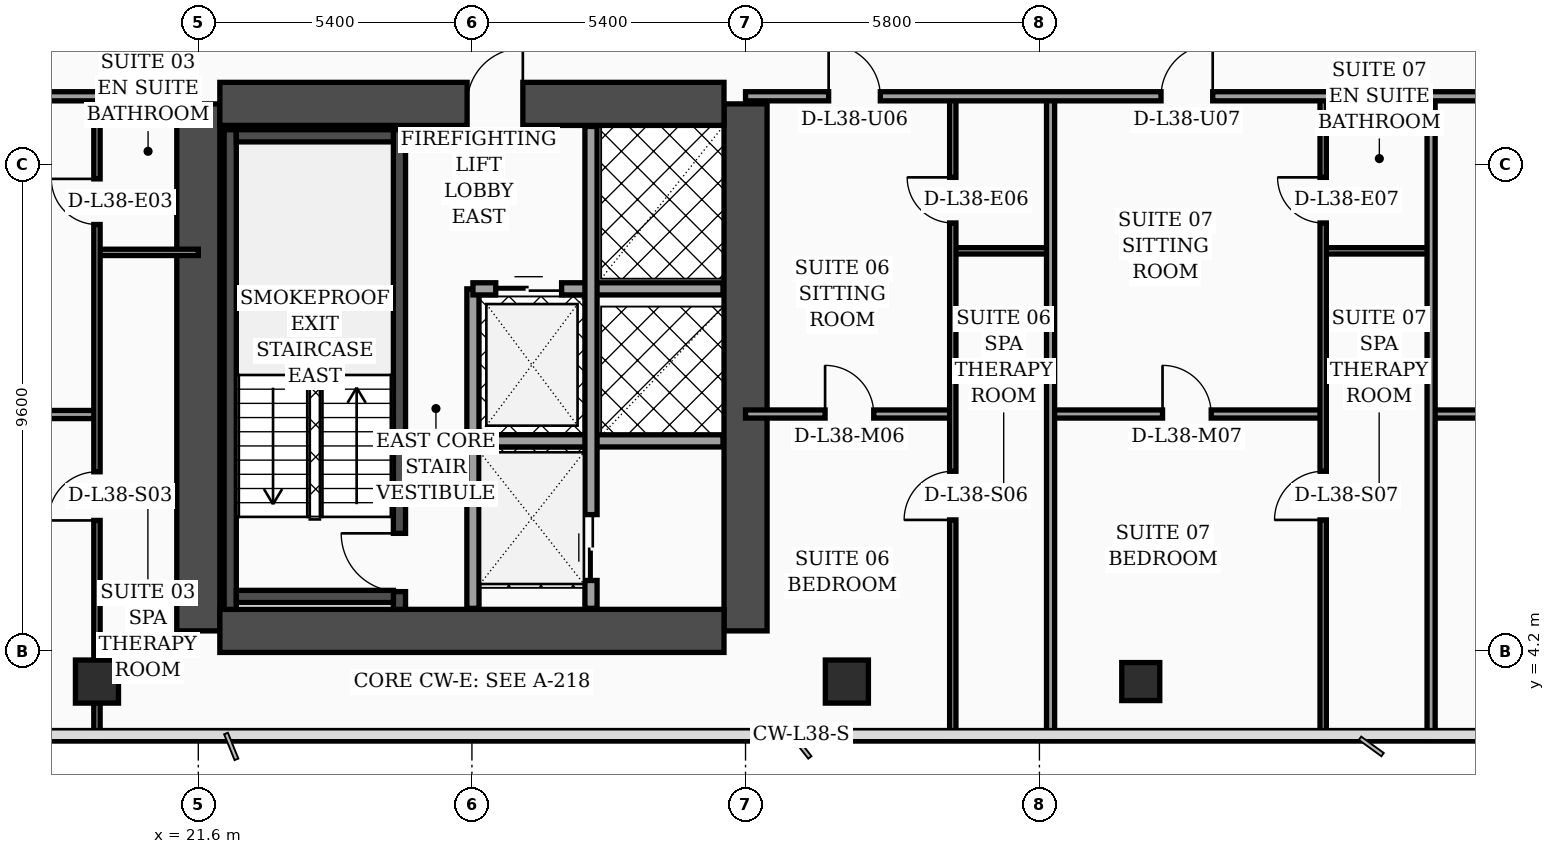
"""IFC4 building model, lengths in metres.
Left out: names, types, materials, properties, quantities, classifications, styles, units other than length and angle.
Written with IfcOpenShell. Run it as: python <this file> out.ifc"""

import sys

from ifc_helpers import new_model, si_unit, direction, frame, frame_2d, origin, origin_2d, place, context, subcontext, project, spatial, rectangle, hollow_rectangle, extrude, element, fill, save


model = new_model("IFC4")
c1 = context("Model", 3, precision=1e-05, world=origin(), true_north=direction((0.0, 1.0)))
c2 = subcontext(c1, "Body", "Model", "MODEL_VIEW")
j1 = project(units=[si_unit("LENGTHUNIT", "METRE"), si_unit("PLANEANGLEUNIT", "RADIAN")], contexts=[c1])
p1 = place(None, origin())
s1 = spatial("IfcSite", under=j1, at=p1, CompositionType="ELEMENT")
p2 = place(p1, origin())
s2 = spatial("IfcBuilding", under=s1, at=p2, CompositionType="ELEMENT")
p3 = place(p2, frame((0.0, 0.0, 156.1)))
s3 = spatial("IfcBuildingStorey", under=s2, at=p3, CompositionType="ELEMENT", Elevation=156.1)
for number, where, z_axis, x_axis in (
    (1, (21.6, 4.6, 0.0), (0.0, 0.0, 1.0), (0.0, 1.0, 0.0)),
    (2, (32.4, 4.6, 0.0), (0.0, 0.0, 1.0), (0.0, 1.0, 0.0)),
):
    element("IfcWall", number, at=place(p3, frame(where, z_axis=z_axis, x_axis=x_axis)), inside=s3, PredefinedType="SHEAR", context=c2, shape_type="SweptSolid", body=[
        extrude(rectangle(XDim=10.4, YDim=0.85, at=frame_2d((5.2, 0.0))), origin(), (0.0, 0.0, 1.0), 3.56),
    ])
p4 = place(p3, frame((22.025, 15.0, 0.0), z_axis=(0.0, 0.0, 1.0), x_axis=(1.0, 0.0, 0.0)))
e3 = element("IfcWall", 3, at=p4, inside=s3, PredefinedType="SHEAR", context=c2, shape_type="SweptSolid", body=[
    extrude(rectangle(XDim=9.95, YDim=0.85, at=frame_2d((4.975, 0.0))), origin(), (0.0, 0.0, 1.0), 3.56),
])
p5 = place(p4, frame((4.88, 0.0, 0.0)))
e4 = element("IfcOpeningElement", 4, at=p5, cuts=e3, PredefinedType="OPENING", context=c2, shape_type="SweptSolid", body=[
    extrude(rectangle(XDim=1.1, YDim=2.2, at=frame_2d((0.55, 1.1))), frame((0.0, 0.435, 0.0), z_axis=(0.0, -1.0, 0.0), x_axis=(1.0, 0.0, 0.0)), (0.0, 0.0, 1.0), 0.87),
])
p6 = place(p3, frame((22.025, 4.6, 0.0), z_axis=(0.0, 0.0, 1.0), x_axis=(1.0, 0.0, 0.0)))
e5 = element("IfcWall", 5, at=p6, inside=s3, PredefinedType="SHEAR", context=c2, shape_type="SweptSolid", body=[
    extrude(rectangle(XDim=9.95, YDim=0.85, at=frame_2d((4.975, 0.0))), origin(), (0.0, 0.0, 1.0), 3.56),
])
p7 = place(p3, frame((22.23, 5.025, 0.0), z_axis=(0.0, 0.0, 1.0), x_axis=(0.0, 1.0, 0.0)))
e6 = element("IfcWall", 6, at=p7, inside=s3, PredefinedType="SOLIDWALL", context=c2, shape_type="SweptSolid", body=[
    extrude(rectangle(XDim=9.465, YDim=0.24, at=frame_2d((4.732, 0.0))), origin(), (0.0, 0.0, 1.0), 3.56),
])
p8 = place(p3, frame((25.57, 5.025, 0.0), z_axis=(0.0, 0.0, 1.0), x_axis=(0.0, 1.0, 0.0)))
e7 = element("IfcWall", 7, at=p8, inside=s3, PredefinedType="SOLIDWALL", context=c2, shape_type="SweptSolid", body=[
    extrude(rectangle(XDim=9.465, YDim=0.24, at=frame_2d((4.732, 0.0))), origin(), (0.0, 0.0, 1.0), 3.56),
])
p9 = place(p8, frame((0.35, 0.0, 0.0)))
e8 = element("IfcOpeningElement", 8, at=p9, cuts=e7, PredefinedType="OPENING", context=c2, shape_type="SweptSolid", body=[
    extrude(rectangle(XDim=1.15, YDim=2.2, at=frame_2d((0.575, 1.1))), frame((0.0, 0.13, 0.0), z_axis=(0.0, -1.0, 0.0), x_axis=(1.0, 0.0, 0.0)), (0.0, 0.0, 1.0), 0.26),
])
for number, where, z_axis, x_axis in (
    (9, (22.35, 5.28, 0.0), (0.0, 0.0, 1.0), (1.0, 0.0, 0.0)),
    (10, (22.35, 14.37, 0.0), (0.0, 0.0, 1.0), (1.0, 0.0, 0.0)),
):
    element("IfcWall", number, at=place(p3, frame(where, z_axis=z_axis, x_axis=x_axis)), inside=s3, PredefinedType="SOLIDWALL", context=c2, shape_type="SweptSolid", body=[
        extrude(rectangle(XDim=3.1, YDim=0.24, at=frame_2d((1.55, 0.0))), origin(), (0.0, 0.0, 1.0), 3.56),
    ])
for number, where, z_axis, x_axis in (
    (11, (19.6, 3.6, 0.0), (0.0, 0.0, 1.0), (1.0, 0.0, 0.0)),
    (12, (34.4, 3.6, 0.0), (0.0, 0.0, 1.0), (1.0, 0.0, 0.0)),
):
    element("IfcColumn", number, at=place(p3, frame(where, z_axis=z_axis, x_axis=x_axis)), inside=s3, PredefinedType="COLUMN", context=c2, shape_type="SweptSolid", body=[
        extrude(hollow_rectangle(XDim=0.85, YDim=0.85, WallThickness=0.036, at=origin_2d()), origin(), (0.0, 0.0, 1.0), 3.56),
    ])
p10 = place(p3, frame((40.2, 3.6, 0.0), z_axis=(0.0, 0.0, 1.0), x_axis=(1.0, 0.0, 0.0)))
e13 = element("IfcColumn", 13, at=p10, inside=s3, PredefinedType="COLUMN", context=c2, shape_type="SweptSolid", body=[
    extrude(hollow_rectangle(XDim=0.75, YDim=0.75, WallThickness=0.032, at=origin_2d()), origin(), (0.0, 0.0, 1.0), 3.56),
])
p11 = place(p3, frame((27.02, 5.045, 0.0), z_axis=(0.0, 0.0, 1.0), x_axis=(0.0, 1.0, 0.0)))
e14 = element("IfcWall", 14, at=p11, inside=s3, PredefinedType="SOLIDWALL", context=c2, shape_type="SweptSolid", body=[
    extrude(rectangle(XDim=6.305, YDim=0.24, at=frame_2d((3.153, 0.0))), origin(), (0.0, 0.0, 1.0), 3.56),
])
p12 = place(p3, frame((27.02, 11.35, 0.0), z_axis=(0.0, 0.0, 1.0), x_axis=(1.0, 0.0, 0.0)))
e15 = element("IfcWall", 15, at=p12, inside=s3, PredefinedType="SOLIDWALL", context=c2, shape_type="SweptSolid", body=[
    extrude(rectangle(XDim=4.935, YDim=0.24, at=frame_2d((2.468, 0.0))), origin(), (0.0, 0.0, 1.0), 3.56),
])
p13 = place(p12, frame((0.45, 0.0, 0.0)))
e16 = element("IfcOpeningElement", 16, at=p13, cuts=e15, PredefinedType="OPENING", context=c2, shape_type="SweptSolid", body=[
    extrude(rectangle(XDim=1.3, YDim=2.35, at=frame_2d((0.65, 1.175))), frame((0.0, 0.13, 0.0), z_axis=(0.0, -1.0, 0.0), x_axis=(1.0, 0.0, 0.0)), (0.0, 0.0, 1.0), 0.26),
])
p14 = place(p3, frame((27.02, 8.35, 0.0), z_axis=(0.0, 0.0, 1.0), x_axis=(1.0, 0.0, 0.0)))
e17 = element("IfcWall", 17, at=p14, inside=s3, PredefinedType="SOLIDWALL", context=c2, shape_type="SweptSolid", body=[
    extrude(rectangle(XDim=4.935, YDim=0.24, at=frame_2d((2.468, 0.0))), origin(), (0.0, 0.0, 1.0), 3.56),
])
p15 = place(p3, frame((29.35, 5.045, 0.0), z_axis=(0.0, 0.0, 1.0), x_axis=(0.0, 1.0, 0.0)))
e18 = element("IfcWall", 18, at=p15, inside=s3, PredefinedType="SOLIDWALL", context=c2, shape_type="SweptSolid", body=[
    extrude(rectangle(XDim=9.51, YDim=0.24, at=frame_2d((4.755, 0.0))), origin(), (0.0, 0.0, 1.0), 3.56),
])
p16 = place(p15, frame((0.55, 0.0, 0.0)))
e19 = element("IfcOpeningElement", 19, at=p16, cuts=e18, PredefinedType="OPENING", context=c2, shape_type="SweptSolid", body=[
    extrude(rectangle(XDim=1.3, YDim=2.35, at=frame_2d((0.65, 1.175))), frame((0.0, 0.13, 0.0), z_axis=(0.0, -1.0, 0.0), x_axis=(1.0, 0.0, 0.0)), (0.0, 0.0, 1.0), 0.26),
])
p17 = place(p3, frame((19.6, 12.07, 0.0), z_axis=(0.0, 0.0, 1.0), x_axis=(1.0, 0.0, 0.0)))
e20 = element("IfcWall", 20, at=p17, inside=s3, PredefinedType="PARTITIONING", context=c2, shape_type="SweptSolid", body=[
    extrude(rectangle(XDim=2.0, YDim=0.125, at=frame_2d((1.0, 0.0))), origin(), (0.0, 0.0, 1.0), 3.56),
])
p18 = place(p3, frame((15.15, 8.87, 0.0), z_axis=(0.0, 0.0, 1.0), x_axis=(1.0, 0.0, 0.0)))
e21 = element("IfcWall", 21, at=p18, inside=s3, PredefinedType="PARTITIONING", context=c2, shape_type="SweptSolid", body=[
    extrude(rectangle(XDim=4.45, YDim=0.16, at=frame_2d((2.225, 0.0))), origin(), (0.0, 0.0, 1.0), 3.56),
])
p19 = place(p18, frame((1.75, 0.0, 0.0)))
e22 = element("IfcOpeningElement", 22, at=p19, cuts=e21, PredefinedType="OPENING", context=c2, shape_type="SweptSolid", body=[
    extrude(rectangle(XDim=0.96, YDim=2.2, at=frame_2d((0.48, 1.1))), frame((0.0, 0.09, 0.0), z_axis=(0.0, -1.0, 0.0), x_axis=(1.0, 0.0, 0.0)), (0.0, 0.0, 1.0), 0.18),
])
p20 = place(p3, frame((19.6, 2.44, 0.0), z_axis=(0.0, 0.0, 1.0), x_axis=(0.0, 1.0, 0.0)))
e23 = element("IfcWall", 23, at=p20, inside=s3, PredefinedType="PARTITIONING", context=c2, shape_type="SweptSolid", body=[
    extrude(rectangle(XDim=12.71, YDim=0.125, at=frame_2d((6.355, 0.0))), origin(), (0.0, 0.0, 1.0), 2.49),
])
p21 = place(p20, frame((4.34, 0.0, 0.0)))
e24 = element("IfcOpeningElement", 24, at=p21, cuts=e23, PredefinedType="OPENING", context=c2, shape_type="SweptSolid", body=[
    extrude(rectangle(XDim=0.96, YDim=2.2, at=frame_2d((0.48, 1.1))), frame((0.0, 0.073, 0.0), z_axis=(0.0, -1.0, 0.0), x_axis=(1.0, 0.0, 0.0)), (0.0, 0.0, 1.0), 0.145),
])
p22 = place(p20, frame((10.18, 0.0, 0.0)))
e25 = element("IfcOpeningElement", 25, at=p22, cuts=e23, PredefinedType="OPENING", context=c2, shape_type="SweptSolid", body=[
    extrude(rectangle(XDim=0.9, YDim=2.15, at=frame_2d((0.45, 1.075))), frame((0.0, 0.073, 0.0), z_axis=(0.0, -1.0, 0.0), x_axis=(1.0, 0.0, 0.0)), (0.0, 0.0, 1.0), 0.145),
])
p23 = place(p3, frame((15.15, 15.15, 0.0), z_axis=(0.0, 0.0, 1.0), x_axis=(1.0, 0.0, 0.0)))
e26 = element("IfcWall", 26, at=p23, inside=s3, PredefinedType="PARTITIONING", context=c2, shape_type="SweptSolid", body=[
    extrude(rectangle(XDim=6.45, YDim=0.18, at=frame_2d((3.225, 0.0))), origin(), (0.0, 0.0, 1.0), 2.49),
])
p24 = place(p23, frame((1.74, 0.0, 0.0)))
e27 = element("IfcOpeningElement", 27, at=p24, cuts=e26, PredefinedType="OPENING", context=c2, shape_type="SweptSolid", body=[
    extrude(rectangle(XDim=1.02, YDim=2.2, at=frame_2d((0.51, 1.1))), frame((0.0, 0.1, 0.0), z_axis=(0.0, -1.0, 0.0), x_axis=(1.0, 0.0, 0.0)), (0.0, 0.0, 1.0), 0.2),
])
p25 = place(p3, frame((36.49, 12.1, 0.0), z_axis=(0.0, 0.0, 1.0), x_axis=(1.0, 0.0, 0.0)))
e28 = element("IfcWall", 28, at=p25, inside=s3, PredefinedType="PARTITIONING", context=c2, shape_type="SweptSolid", body=[
    extrude(rectangle(XDim=1.93, YDim=0.125, at=frame_2d((0.965, 0.0))), origin(), (0.0, 0.0, 1.0), 3.56),
])
p26 = place(p3, frame((32.4, 8.88, 0.0), z_axis=(0.0, 0.0, 1.0), x_axis=(1.0, 0.0, 0.0)))
e29 = element("IfcWall", 29, at=p26, inside=s3, PredefinedType="PARTITIONING", context=c2, shape_type="SweptSolid", body=[
    extrude(rectangle(XDim=4.09, YDim=0.16, at=frame_2d((2.045, 0.0))), origin(), (0.0, 0.0, 1.0), 2.94),
])
p27 = place(p26, frame((1.57, 0.0, 0.0)))
e30 = element("IfcOpeningElement", 30, at=p27, cuts=e29, PredefinedType="OPENING", context=c2, shape_type="SweptSolid", body=[
    extrude(rectangle(XDim=0.96, YDim=2.2, at=frame_2d((0.48, 1.1))), frame((0.0, 0.09, 0.0), z_axis=(0.0, -1.0, 0.0), x_axis=(1.0, 0.0, 0.0)), (0.0, 0.0, 1.0), 0.18),
])
p28 = place(p3, frame((36.49, 2.44, 0.0), z_axis=(0.0, 0.0, 1.0), x_axis=(0.0, 1.0, 0.0)))
e31 = element("IfcWall", 31, at=p28, inside=s3, PredefinedType="PARTITIONING", context=c2, shape_type="SweptSolid", body=[
    extrude(rectangle(XDim=12.71, YDim=0.125, at=frame_2d((6.355, 0.0))), origin(), (0.0, 0.0, 1.0), 2.94),
])
p29 = place(p28, frame((4.35, 0.0, 0.0)))
e32 = element("IfcOpeningElement", 32, at=p29, cuts=e31, PredefinedType="OPENING", context=c2, shape_type="SweptSolid", body=[
    extrude(rectangle(XDim=0.96, YDim=2.2, at=frame_2d((0.48, 1.1))), frame((0.0, 0.073, 0.0), z_axis=(0.0, -1.0, 0.0), x_axis=(1.0, 0.0, 0.0)), (0.0, 0.0, 1.0), 0.145),
])
p30 = place(p28, frame((10.21, 0.0, 0.0)))
e33 = element("IfcOpeningElement", 33, at=p30, cuts=e31, PredefinedType="OPENING", context=c2, shape_type="SweptSolid", body=[
    extrude(rectangle(XDim=0.9, YDim=2.15, at=frame_2d((0.45, 1.075))), frame((0.0, 0.073, 0.0), z_axis=(0.0, -1.0, 0.0), x_axis=(1.0, 0.0, 0.0)), (0.0, 0.0, 1.0), 0.145),
])
p31 = place(p3, frame((43.8, 12.1, 0.0), z_axis=(0.0, 0.0, 1.0), x_axis=(1.0, 0.0, 0.0)))
e34 = element("IfcWall", 34, at=p31, inside=s3, PredefinedType="PARTITIONING", context=c2, shape_type="SweptSolid", body=[
    extrude(rectangle(XDim=2.13, YDim=0.125, at=frame_2d((1.065, 0.0))), origin(), (0.0, 0.0, 1.0), 3.56),
])
p32 = place(p3, frame((38.42, 8.88, 0.0), z_axis=(0.0, 0.0, 1.0), x_axis=(1.0, 0.0, 0.0)))
e35 = element("IfcWall", 35, at=p32, inside=s3, PredefinedType="PARTITIONING", context=c2, shape_type="SweptSolid", body=[
    extrude(rectangle(XDim=5.38, YDim=0.16, at=frame_2d((2.69, 0.0))), origin(), (0.0, 0.0, 1.0), 3.56),
])
p33 = place(p32, frame((2.21, 0.0, 0.0)))
e36 = element("IfcOpeningElement", 36, at=p33, cuts=e35, PredefinedType="OPENING", context=c2, shape_type="SweptSolid", body=[
    extrude(rectangle(XDim=0.96, YDim=2.2, at=frame_2d((0.48, 1.1))), frame((0.0, 0.09, 0.0), z_axis=(0.0, -1.0, 0.0), x_axis=(1.0, 0.0, 0.0)), (0.0, 0.0, 1.0), 0.18),
])
p34 = place(p3, frame((43.8, 2.44, 0.0), z_axis=(0.0, 0.0, 1.0), x_axis=(0.0, 1.0, 0.0)))
e37 = element("IfcWall", 37, at=p34, inside=s3, PredefinedType="PARTITIONING", context=c2, shape_type="SweptSolid", body=[
    extrude(rectangle(XDim=12.71, YDim=0.125, at=frame_2d((6.355, 0.0))), origin(), (0.0, 0.0, 1.0), 3.04),
])
p35 = place(p34, frame((4.35, 0.0, 0.0)))
e38 = element("IfcOpeningElement", 38, at=p35, cuts=e37, PredefinedType="OPENING", context=c2, shape_type="SweptSolid", body=[
    extrude(rectangle(XDim=0.96, YDim=2.2, at=frame_2d((0.48, 1.1))), frame((0.0, 0.073, 0.0), z_axis=(0.0, -1.0, 0.0), x_axis=(1.0, 0.0, 0.0)), (0.0, 0.0, 1.0), 0.145),
])
p36 = place(p34, frame((10.21, 0.0, 0.0)))
e39 = element("IfcOpeningElement", 39, at=p36, cuts=e37, PredefinedType="OPENING", context=c2, shape_type="SweptSolid", body=[
    extrude(rectangle(XDim=0.9, YDim=2.15, at=frame_2d((0.45, 1.075))), frame((0.0, 0.073, 0.0), z_axis=(0.0, -1.0, 0.0), x_axis=(1.0, 0.0, 0.0)), (0.0, 0.0, 1.0), 0.145),
])
p37 = place(p3, frame((38.42, 2.44, 0.0), z_axis=(0.0, 0.0, 1.0), x_axis=(0.0, 1.0, 0.0)))
e40 = element("IfcWall", 40, at=p37, inside=s3, PredefinedType="PARTITIONING", context=c2, shape_type="SweptSolid", body=[
    extrude(rectangle(XDim=12.71, YDim=0.16, at=frame_2d((6.355, 0.0))), origin(), (0.0, 0.0, 1.0), 2.94),
])
p38 = place(p3, frame((45.93, 8.88, 0.0), z_axis=(0.0, 0.0, 1.0), x_axis=(1.0, 0.0, 0.0)))
e41 = element("IfcWall", 41, at=p38, inside=s3, PredefinedType="PARTITIONING", context=c2, shape_type="SweptSolid", body=[
    extrude(rectangle(XDim=4.74, YDim=0.16, at=frame_2d((2.37, 0.0))), origin(), (0.0, 0.0, 1.0), 2.94),
])
p39 = place(p38, frame((1.89, 0.0, 0.0)))
e42 = element("IfcOpeningElement", 42, at=p39, cuts=e41, PredefinedType="OPENING", context=c2, shape_type="SweptSolid", body=[
    extrude(rectangle(XDim=0.96, YDim=2.2, at=frame_2d((0.48, 1.1))), frame((0.0, 0.09, 0.0), z_axis=(0.0, -1.0, 0.0), x_axis=(1.0, 0.0, 0.0)), (0.0, 0.0, 1.0), 0.18),
])
p40 = place(p3, frame((45.93, 2.44, 0.0), z_axis=(0.0, 0.0, 1.0), x_axis=(0.0, 1.0, 0.0)))
e43 = element("IfcWall", 43, at=p40, inside=s3, PredefinedType="PARTITIONING", context=c2, shape_type="SweptSolid", body=[
    extrude(rectangle(XDim=12.71, YDim=0.16, at=frame_2d((6.355, 0.0))), origin(), (0.0, 0.0, 1.0), 3.04),
])
p41 = place(p3, frame((32.4, 15.15, 0.0), z_axis=(0.0, 0.0, 1.0), x_axis=(1.0, 0.0, 0.0)))
e44 = element("IfcWall", 44, at=p41, inside=s3, PredefinedType="PARTITIONING", context=c2, shape_type="SweptSolid", body=[
    extrude(rectangle(XDim=20.2, YDim=0.18, at=frame_2d((10.1, 0.0))), origin(), (0.0, 0.0, 1.0), 2.94),
])
p42 = place(p41, frame((1.64, 0.0, 0.0)))
e45 = element("IfcOpeningElement", 45, at=p42, cuts=e44, PredefinedType="OPENING", context=c2, shape_type="SweptSolid", body=[
    extrude(rectangle(XDim=1.02, YDim=2.2, at=frame_2d((0.51, 1.1))), frame((0.0, 0.1, 0.0), z_axis=(0.0, -1.0, 0.0), x_axis=(1.0, 0.0, 0.0)), (0.0, 0.0, 1.0), 0.2),
])
p43 = place(p41, frame((8.2, 0.0, 0.0)))
e46 = element("IfcOpeningElement", 46, at=p43, cuts=e44, PredefinedType="OPENING", context=c2, shape_type="SweptSolid", body=[
    extrude(rectangle(XDim=1.02, YDim=2.2, at=frame_2d((0.51, 1.1))), frame((0.0, 0.1, 0.0), z_axis=(0.0, -1.0, 0.0), x_axis=(1.0, 0.0, 0.0)), (0.0, 0.0, 1.0), 0.2),
])
p44 = place(p41, frame((15.39, 0.0, 0.0)))
e47 = element("IfcOpeningElement", 47, at=p44, cuts=e44, PredefinedType="OPENING", context=c2, shape_type="SweptSolid", body=[
    extrude(rectangle(XDim=1.02, YDim=2.2, at=frame_2d((0.51, 1.1))), frame((0.0, 0.1, 0.0), z_axis=(0.0, -1.0, 0.0), x_axis=(1.0, 0.0, 0.0)), (0.0, 0.0, 1.0), 0.2),
])
p45 = place(p13, origin())
e48 = element("IfcDoor", 48, at=p45, inside=s3, OperationType="DOUBLE_DOOR_SLIDING", PredefinedType="DOOR", context=c2, shape_type="SweptSolid", body=[
    extrude(rectangle(XDim=1.3, YDim=2.35, at=frame_2d((0.65, 1.175))), frame((0.0, 0.025, 0.0), z_axis=(0.0, -1.0, 0.0), x_axis=(1.0, 0.0, 0.0)), (0.0, 0.0, 1.0), 0.05),
])
fill(e16, e48)
p46 = place(p16, origin())
e49 = element("IfcDoor", 49, at=p46, inside=s3, OperationType="DOUBLE_DOOR_SLIDING", PredefinedType="DOOR", context=c2, shape_type="SweptSolid", body=[
    extrude(rectangle(XDim=1.3, YDim=2.35, at=frame_2d((0.65, 1.175))), frame((0.0, 0.025, 0.0), z_axis=(0.0, -1.0, 0.0), x_axis=(1.0, 0.0, 0.0)), (0.0, 0.0, 1.0), 0.05),
])
fill(e19, e49)
p47 = place(p21, origin())
e50 = element("IfcDoor", 50, at=p47, inside=s3, OperationType="SINGLE_SWING_LEFT", PredefinedType="DOOR", context=c2, shape_type="SweptSolid", body=[
    extrude(rectangle(XDim=0.96, YDim=2.2, at=frame_2d((0.48, 1.1))), frame((0.0, 0.025, 0.0), z_axis=(0.0, -1.0, 0.0), x_axis=(1.0, 0.0, 0.0)), (0.0, 0.0, 1.0), 0.05),
])
fill(e24, e50)
p48 = place(p22, origin())
e51 = element("IfcDoor", 51, at=p48, inside=s3, OperationType="SINGLE_SWING_RIGHT", PredefinedType="DOOR", context=c2, shape_type="SweptSolid", body=[
    extrude(rectangle(XDim=0.9, YDim=2.15, at=frame_2d((0.45, 1.075))), frame((0.0, 0.025, 0.0), z_axis=(0.0, -1.0, 0.0), x_axis=(1.0, 0.0, 0.0)), (0.0, 0.0, 1.0), 0.05),
])
fill(e25, e51)
p49 = place(p27, origin())
e52 = element("IfcDoor", 52, at=p49, inside=s3, OperationType="SINGLE_SWING_LEFT", PredefinedType="DOOR", context=c2, shape_type="SweptSolid", body=[
    extrude(rectangle(XDim=0.96, YDim=2.2, at=frame_2d((0.48, 1.1))), frame((0.0, 0.025, 0.0), z_axis=(0.0, -1.0, 0.0), x_axis=(1.0, 0.0, 0.0)), (0.0, 0.0, 1.0), 0.05),
])
fill(e30, e52)
p50 = place(p29, origin())
e53 = element("IfcDoor", 53, at=p50, inside=s3, OperationType="SINGLE_SWING_LEFT", PredefinedType="DOOR", context=c2, shape_type="SweptSolid", body=[
    extrude(rectangle(XDim=0.96, YDim=2.2, at=frame_2d((0.48, 1.1))), frame((0.0, 0.025, 0.0), z_axis=(0.0, -1.0, 0.0), x_axis=(1.0, 0.0, 0.0)), (0.0, 0.0, 1.0), 0.05),
])
fill(e32, e53)
p51 = place(p30, origin())
e54 = element("IfcDoor", 54, at=p51, inside=s3, OperationType="SINGLE_SWING_RIGHT", PredefinedType="DOOR", context=c2, shape_type="SweptSolid", body=[
    extrude(rectangle(XDim=0.9, YDim=2.15, at=frame_2d((0.45, 1.075))), frame((0.0, 0.025, 0.0), z_axis=(0.0, -1.0, 0.0), x_axis=(1.0, 0.0, 0.0)), (0.0, 0.0, 1.0), 0.05),
])
fill(e33, e54)
p52 = place(p33, origin())
e55 = element("IfcDoor", 55, at=p52, inside=s3, OperationType="SINGLE_SWING_LEFT", PredefinedType="DOOR", context=c2, shape_type="SweptSolid", body=[
    extrude(rectangle(XDim=0.96, YDim=2.2, at=frame_2d((0.48, 1.1))), frame((0.0, 0.025, 0.0), z_axis=(0.0, -1.0, 0.0), x_axis=(1.0, 0.0, 0.0)), (0.0, 0.0, 1.0), 0.05),
])
fill(e36, e55)
p53 = place(p35, origin())
e56 = element("IfcDoor", 56, at=p53, inside=s3, OperationType="SINGLE_SWING_LEFT", PredefinedType="DOOR", context=c2, shape_type="SweptSolid", body=[
    extrude(rectangle(XDim=0.96, YDim=2.2, at=frame_2d((0.48, 1.1))), frame((0.0, 0.025, 0.0), z_axis=(0.0, -1.0, 0.0), x_axis=(1.0, 0.0, 0.0)), (0.0, 0.0, 1.0), 0.05),
])
fill(e38, e56)
p54 = place(p36, origin())
e57 = element("IfcDoor", 57, at=p54, inside=s3, OperationType="SINGLE_SWING_RIGHT", PredefinedType="DOOR", context=c2, shape_type="SweptSolid", body=[
    extrude(rectangle(XDim=0.9, YDim=2.15, at=frame_2d((0.45, 1.075))), frame((0.0, 0.025, 0.0), z_axis=(0.0, -1.0, 0.0), x_axis=(1.0, 0.0, 0.0)), (0.0, 0.0, 1.0), 0.05),
])
fill(e39, e57)
p55 = place(p42, origin())
e58 = element("IfcDoor", 58, at=p55, inside=s3, OperationType="SINGLE_SWING_LEFT", PredefinedType="DOOR", context=c2, shape_type="SweptSolid", body=[
    extrude(rectangle(XDim=1.02, YDim=2.2, at=frame_2d((0.51, 1.1))), frame((0.0, 0.025, 0.0), z_axis=(0.0, -1.0, 0.0), x_axis=(1.0, 0.0, 0.0)), (0.0, 0.0, 1.0), 0.05),
])
fill(e45, e58)
p56 = place(p43, origin())
e59 = element("IfcDoor", 59, at=p56, inside=s3, OperationType="SINGLE_SWING_RIGHT", PredefinedType="DOOR", context=c2, shape_type="SweptSolid", body=[
    extrude(rectangle(XDim=1.02, YDim=2.2, at=frame_2d((0.51, 1.1))), frame((0.0, 0.025, 0.0), z_axis=(0.0, -1.0, 0.0), x_axis=(1.0, 0.0, 0.0)), (0.0, 0.0, 1.0), 0.05),
])
fill(e46, e59)
p57 = place(p9, origin())
e60 = element("IfcDoor", 60, at=p57, inside=s3, OperationType="SINGLE_SWING_RIGHT", PredefinedType="DOOR", context=c2, shape_type="SweptSolid", body=[
    extrude(rectangle(XDim=1.15, YDim=2.2, at=frame_2d((0.575, 1.1))), frame((0.0, 0.025, 0.0), z_axis=(0.0, -1.0, 0.0), x_axis=(1.0, 0.0, 0.0)), (0.0, 0.0, 1.0), 0.05),
])
fill(e8, e60)
p58 = place(p5, origin())
e61 = element("IfcDoor", 61, at=p58, inside=s3, OperationType="SINGLE_SWING_RIGHT", PredefinedType="DOOR", context=c2, shape_type="SweptSolid", body=[
    extrude(rectangle(XDim=1.1, YDim=2.2, at=frame_2d((0.55, 1.1))), frame((0.0, 0.025, 0.0), z_axis=(0.0, -1.0, 0.0), x_axis=(1.0, 0.0, 0.0)), (0.0, 0.0, 1.0), 0.05),
])
fill(e4, e61)
save(model, sys.argv[1])
